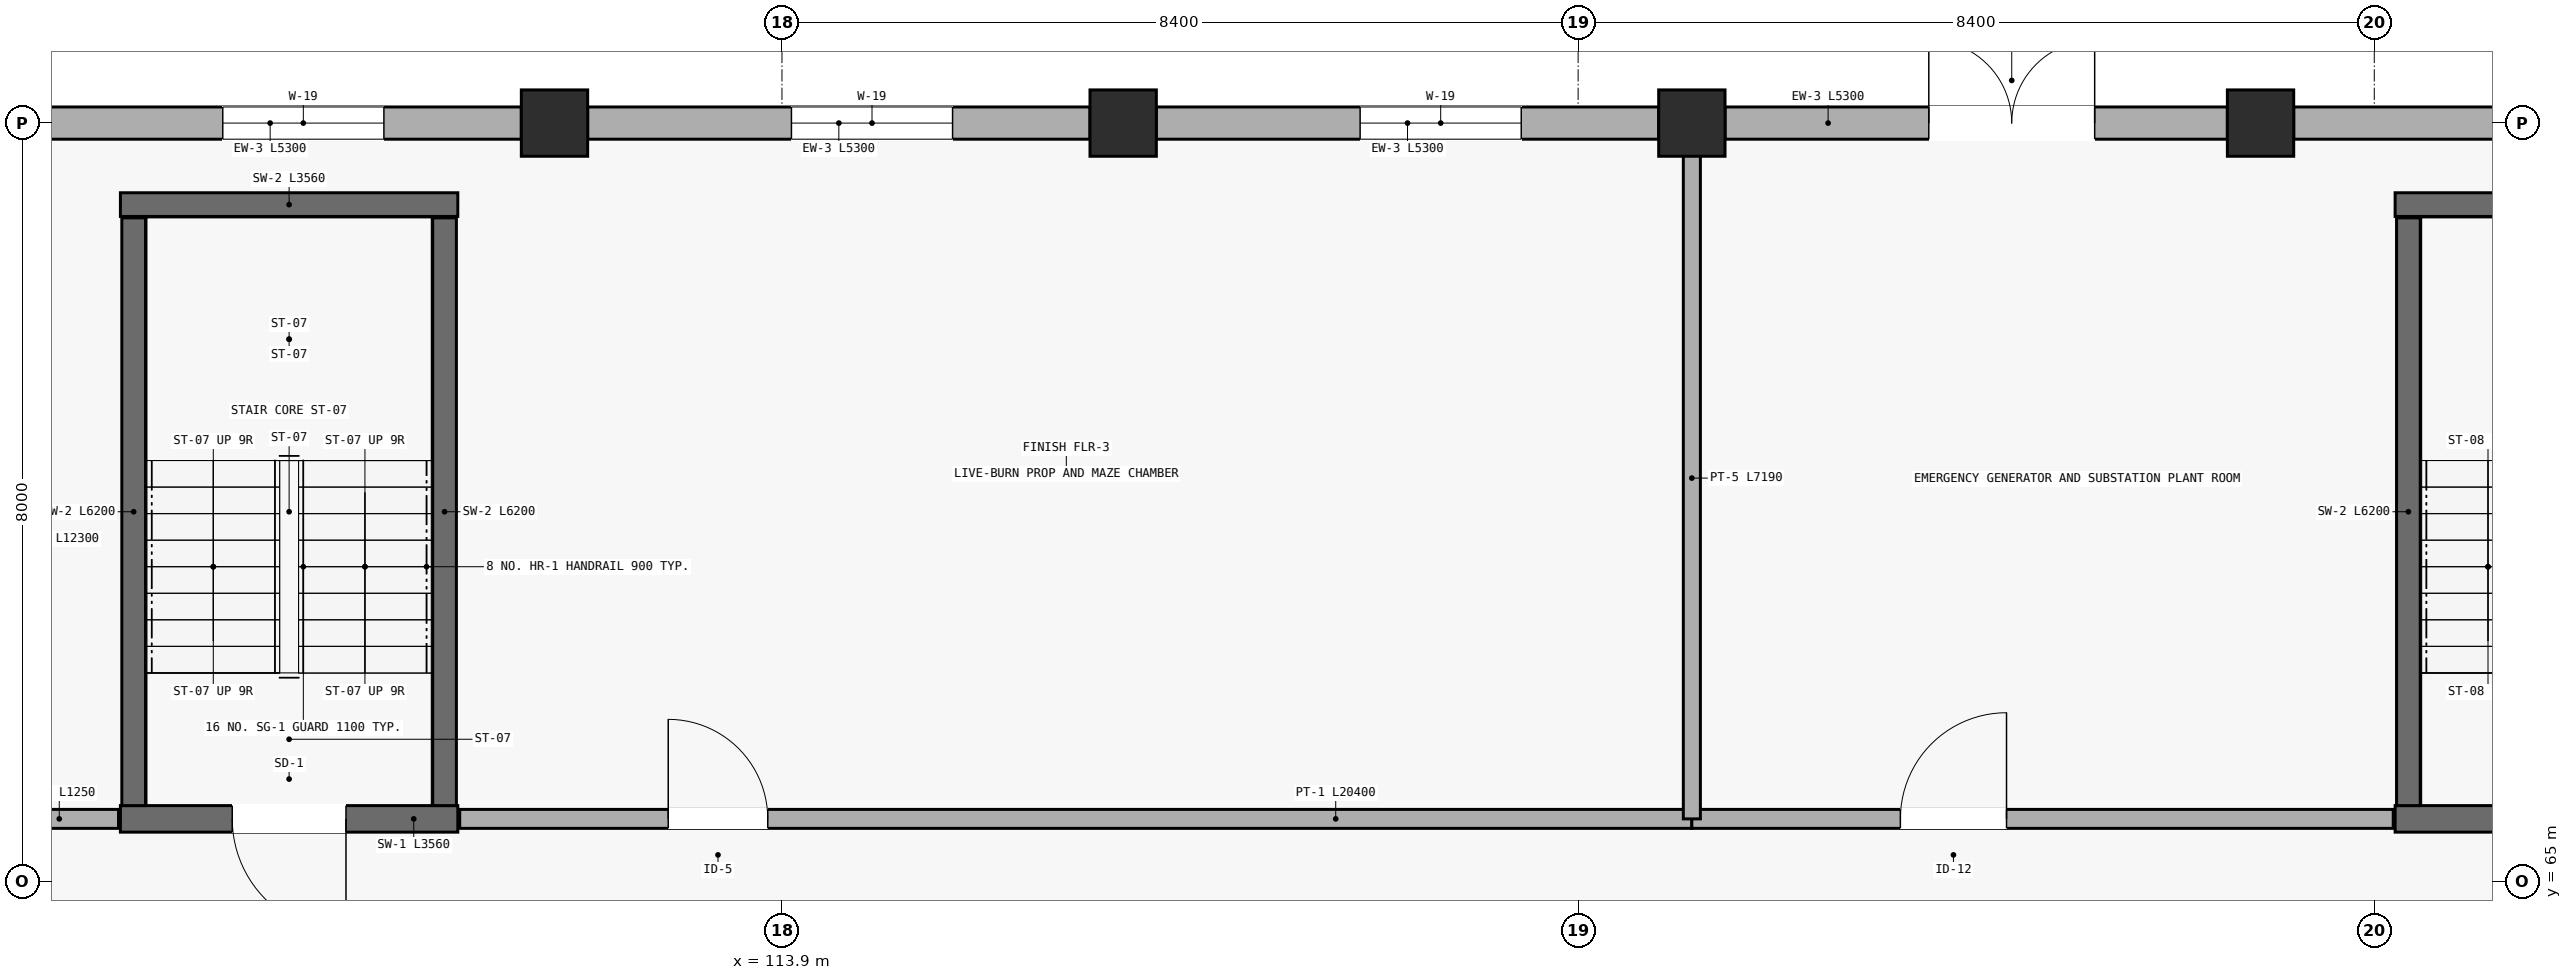
"""IFC4 building model, lengths in metres.
Left out: names, types, materials, properties, quantities, classifications, styles, units other than length and angle.
Written with IfcOpenShell. Run it as: python <this file> out.ifc"""

import sys

from ifc_helpers import new_model, si_unit, direction, frame, frame_2d, origin, origin_2d, place, context, subcontext, project, spatial, rectangle, extrude, element, fill, save


model = new_model("IFC4")
c1 = context("Model", 3, precision=1e-05, world=origin(), true_north=direction((0.0, 1.0)))
c2 = subcontext(c1, "Body", "Model", "MODEL_VIEW")
j1 = project(units=[si_unit("LENGTHUNIT", "METRE"), si_unit("PLANEANGLEUNIT", "RADIAN")], contexts=[c1])
p1 = place(None, origin())
s1 = spatial("IfcSite", under=j1, at=p1, CompositionType="ELEMENT")
p2 = place(p1, origin())
s2 = spatial("IfcBuilding", under=s1, at=p2, CompositionType="ELEMENT")
p3 = place(p2, origin())
s3 = spatial("IfcBuildingStorey", under=s2, at=p3, CompositionType="ELEMENT", Elevation=0.0)
for number, where, z_axis, x_axis in (
    (1, (111.5, 73.0, 0.0), (0.0, 0.0, 1.0), (1.0, 0.0, 0.0)),
    (2, (117.5, 73.0, 0.0), (0.0, 0.0, 1.0), (1.0, 0.0, 0.0)),
    (3, (123.5, 73.0, 0.0), (0.0, 0.0, 1.0), (1.0, 0.0, 0.0)),
    (4, (129.5, 73.0, 0.0), (0.0, 0.0, 1.0), (1.0, 0.0, 0.0)),
):
    element("IfcColumn", number, at=place(p3, frame(where, z_axis=z_axis, x_axis=x_axis)), inside=s3, PredefinedType="COLUMN", context=c2, shape_type="SweptSolid", body=[
        extrude(rectangle(XDim=0.7, YDim=0.7, at=origin_2d()), origin(), (0.0, 0.0, 1.0), 5.85),
    ])
p4 = place(p3, frame((111.15, 73.0, 0.0), z_axis=(0.0, 0.0, 1.0), x_axis=(-1.0, 0.0, 0.0)))
e5 = element("IfcWall", 5, at=p4, inside=s3, PredefinedType="STANDARD", context=c2, shape_type="SweptSolid", body=[
    extrude(rectangle(XDim=5.3, YDim=0.34, at=frame_2d((2.65, 0.0))), origin(), (0.0, 0.0, 1.0), 4.678),
])
p5 = place(p4, frame((1.45, 0.0, 0.85)))
e6 = element("IfcOpeningElement", 6, at=p5, cuts=e5, PredefinedType="OPENING", context=c2, shape_type="SweptSolid", body=[
    extrude(rectangle(XDim=1.7, YDim=1.35, at=frame_2d((0.85, 0.675))), frame((0.0, 0.18, 0.0), z_axis=(0.0, -1.0, 0.0), x_axis=(1.0, 0.0, 0.0)), (0.0, 0.0, 1.0), 0.36),
])
p6 = place(p3, frame((117.15, 73.0, 0.0), z_axis=(0.0, 0.0, 1.0), x_axis=(-1.0, 0.0, 0.0)))
e7 = element("IfcWall", 7, at=p6, inside=s3, PredefinedType="STANDARD", context=c2, shape_type="SweptSolid", body=[
    extrude(rectangle(XDim=5.3, YDim=0.34, at=frame_2d((2.65, 0.0))), origin(), (0.0, 0.0, 1.0), 4.678),
])
p7 = place(p6, frame((1.45, 0.0, 0.85)))
e8 = element("IfcOpeningElement", 8, at=p7, cuts=e7, PredefinedType="OPENING", context=c2, shape_type="SweptSolid", body=[
    extrude(rectangle(XDim=1.7, YDim=1.35, at=frame_2d((0.85, 0.675))), frame((0.0, 0.18, 0.0), z_axis=(0.0, -1.0, 0.0), x_axis=(1.0, 0.0, 0.0)), (0.0, 0.0, 1.0), 0.36),
])
p8 = place(p3, frame((123.15, 73.0, 0.0), z_axis=(0.0, 0.0, 1.0), x_axis=(-1.0, 0.0, 0.0)))
e9 = element("IfcWall", 9, at=p8, inside=s3, PredefinedType="STANDARD", context=c2, shape_type="SweptSolid", body=[
    extrude(rectangle(XDim=5.3, YDim=0.34, at=frame_2d((2.65, 0.0))), origin(), (0.0, 0.0, 1.0), 4.678),
])
p9 = place(p8, frame((1.45, 0.0, 0.85)))
e10 = element("IfcOpeningElement", 10, at=p9, cuts=e9, PredefinedType="OPENING", context=c2, shape_type="SweptSolid", body=[
    extrude(rectangle(XDim=1.7, YDim=1.35, at=frame_2d((0.85, 0.675))), frame((0.0, 0.18, 0.0), z_axis=(0.0, -1.0, 0.0), x_axis=(1.0, 0.0, 0.0)), (0.0, 0.0, 1.0), 0.36),
])
p10 = place(p3, frame((129.15, 73.0, 0.0), z_axis=(0.0, 0.0, 1.0), x_axis=(-1.0, 0.0, 0.0)))
e11 = element("IfcWall", 11, at=p10, inside=s3, PredefinedType="STANDARD", context=c2, shape_type="SweptSolid", body=[
    extrude(rectangle(XDim=5.3, YDim=0.34, at=frame_2d((2.65, 0.0))), origin(), (0.0, 0.0, 1.0), 4.678),
])
p11 = place(p10, frame((1.4, 0.0, 0.0)))
e12 = element("IfcOpeningElement", 12, at=p11, cuts=e11, PredefinedType="OPENING", context=c2, shape_type="SweptSolid", body=[
    extrude(rectangle(XDim=1.75, YDim=2.2, at=frame_2d((0.875, 1.1))), frame((0.0, 0.18, 0.0), z_axis=(0.0, -1.0, 0.0), x_axis=(1.0, 0.0, 0.0)), (0.0, 0.0, 1.0), 0.36),
])
p12 = place(p3, frame((135.15, 73.0, 0.0), z_axis=(0.0, 0.0, 1.0), x_axis=(-1.0, 0.0, 0.0)))
e13 = element("IfcWall", 13, at=p12, inside=s3, PredefinedType="STANDARD", context=c2, shape_type="SweptSolid", body=[
    extrude(rectangle(XDim=5.3, YDim=0.34, at=frame_2d((2.65, 0.0))), origin(), (0.0, 0.0, 1.0), 4.678),
])
p13 = place(p12, frame((1.45, 0.0, 0.85)))
e14 = element("IfcOpeningElement", 14, at=p13, cuts=e13, PredefinedType="OPENING", context=c2, shape_type="SweptSolid", body=[
    extrude(rectangle(XDim=1.7, YDim=1.35, at=frame_2d((0.85, 0.675))), frame((0.0, 0.18, 0.0), z_axis=(0.0, -1.0, 0.0), x_axis=(1.0, 0.0, 0.0)), (0.0, 0.0, 1.0), 0.36),
])
p14 = place(p3, frame((110.48, 65.66, 0.0), z_axis=(0.0, 0.0, 1.0), x_axis=(-1.0, 0.0, 0.0)))
e15 = element("IfcWall", 15, at=p14, inside=s3, PredefinedType="SHEAR", context=c2, shape_type="SweptSolid", body=[
    extrude(rectangle(XDim=3.56, YDim=0.28, at=frame_2d((1.78, 0.0))), origin(), (0.0, 0.0, 1.0), 5.6),
])
p15 = place(p14, frame((1.18, 0.0, 0.0)))
e16 = element("IfcOpeningElement", 16, at=p15, cuts=e15, PredefinedType="OPENING", context=c2, shape_type="SweptSolid", body=[
    extrude(rectangle(XDim=1.2, YDim=2.15, at=frame_2d((0.6, 1.075))), frame((0.0, 0.15, 0.0), z_axis=(0.0, -1.0, 0.0), x_axis=(1.0, 0.0, 0.0)), (0.0, 0.0, 1.0), 0.3),
])
p16 = place(p3, frame((106.92, 72.14, 0.0), z_axis=(0.0, 0.0, 1.0), x_axis=(1.0, 0.0, 0.0)))
e17 = element("IfcWall", 17, at=p16, inside=s3, PredefinedType="SHEAR", context=c2, shape_type="SweptSolid", body=[
    extrude(rectangle(XDim=3.56, YDim=0.25, at=frame_2d((1.78, 0.0))), origin(), (0.0, 0.0, 1.0), 5.6),
])
for number, where, z_axis, x_axis in (
    (18, (110.34, 65.8, 0.0), (0.0, 0.0, 1.0), (0.0, 1.0, 0.0)),
    (19, (107.06, 72.0, 0.0), (0.0, 0.0, 1.0), (0.0, -1.0, 0.0)),
):
    element("IfcWall", number, at=place(p3, frame(where, z_axis=z_axis, x_axis=x_axis)), inside=s3, PredefinedType="SHEAR", context=c2, shape_type="SweptSolid", body=[
        extrude(rectangle(XDim=6.2, YDim=0.25, at=frame_2d((3.1, 0.0))), origin(), (0.0, 0.0, 1.0), 5.6),
    ])
p17 = place(p3, frame((134.48, 65.66, 0.0), z_axis=(0.0, 0.0, 1.0), x_axis=(-1.0, 0.0, 0.0)))
e20 = element("IfcWall", 20, at=p17, inside=s3, PredefinedType="SHEAR", context=c2, shape_type="SweptSolid", body=[
    extrude(rectangle(XDim=3.56, YDim=0.28, at=frame_2d((1.78, 0.0))), origin(), (0.0, 0.0, 1.0), 5.6),
])
p18 = place(p17, frame((1.18, 0.0, 0.0)))
e21 = element("IfcOpeningElement", 21, at=p18, cuts=e20, PredefinedType="OPENING", context=c2, shape_type="SweptSolid", body=[
    extrude(rectangle(XDim=1.2, YDim=2.15, at=frame_2d((0.6, 1.075))), frame((0.0, 0.15, 0.0), z_axis=(0.0, -1.0, 0.0), x_axis=(1.0, 0.0, 0.0)), (0.0, 0.0, 1.0), 0.3),
])
p19 = place(p3, frame((130.92, 72.14, 0.0), z_axis=(0.0, 0.0, 1.0), x_axis=(1.0, 0.0, 0.0)))
e22 = element("IfcWall", 22, at=p19, inside=s3, PredefinedType="SHEAR", context=c2, shape_type="SweptSolid", body=[
    extrude(rectangle(XDim=3.56, YDim=0.25, at=frame_2d((1.78, 0.0))), origin(), (0.0, 0.0, 1.0), 5.6),
])
p20 = place(p3, frame((131.06, 72.0, 0.0), z_axis=(0.0, 0.0, 1.0), x_axis=(0.0, -1.0, 0.0)))
e23 = element("IfcWall", 23, at=p20, inside=s3, PredefinedType="SHEAR", context=c2, shape_type="SweptSolid", body=[
    extrude(rectangle(XDim=6.2, YDim=0.25, at=frame_2d((3.1, 0.0))), origin(), (0.0, 0.0, 1.0), 5.6),
])
p21 = place(p3, frame((105.65, 65.66, 0.0), z_axis=(0.0, 0.0, 1.0), x_axis=(1.0, 0.0, 0.0)))
e24 = element("IfcWall", 24, at=p21, inside=s3, PredefinedType="PARTITIONING", context=c2, shape_type="SweptSolid", body=[
    extrude(rectangle(XDim=1.25, YDim=0.2, at=frame_2d((0.625, 0.0))), origin(), (0.0, 0.0, 1.0), 5.0),
])
p22 = place(p3, frame((110.5, 65.66, 0.0), z_axis=(0.0, 0.0, 1.0), x_axis=(1.0, 0.0, 0.0)))
e25 = element("IfcWall", 25, at=p22, inside=s3, PredefinedType="PARTITIONING", context=c2, shape_type="SweptSolid", body=[
    extrude(rectangle(XDim=13.0, YDim=0.2, at=frame_2d((6.5, 0.0))), origin(), (0.0, 0.0, 1.0), 5.0),
])
p23 = place(p22, frame((2.2, 0.0, 0.0)))
e26 = element("IfcOpeningElement", 26, at=p23, cuts=e25, PredefinedType="OPENING", context=c2, shape_type="SweptSolid", body=[
    extrude(rectangle(XDim=1.05, YDim=2.14, at=frame_2d((0.525, 1.07))), frame((0.0, 0.11, 0.0), z_axis=(0.0, -1.0, 0.0), x_axis=(1.0, 0.0, 0.0)), (0.0, 0.0, 1.0), 0.22),
])
p24 = place(p3, frame((123.5, 65.66, 0.0), z_axis=(0.0, 0.0, 1.0), x_axis=(1.0, 0.0, 0.0)))
e27 = element("IfcWall", 27, at=p24, inside=s3, PredefinedType="PARTITIONING", context=c2, shape_type="SweptSolid", body=[
    extrude(rectangle(XDim=7.4, YDim=0.2, at=frame_2d((3.7, 0.0))), origin(), (0.0, 0.0, 1.0), 5.0),
])
p25 = place(p24, frame((2.2, 0.0, 0.0)))
e28 = element("IfcOpeningElement", 28, at=p25, cuts=e27, PredefinedType="OPENING", context=c2, shape_type="SweptSolid", body=[
    extrude(rectangle(XDim=1.12, YDim=2.15, at=frame_2d((0.56, 1.075))), frame((0.0, 0.11, 0.0), z_axis=(0.0, -1.0, 0.0), x_axis=(1.0, 0.0, 0.0)), (0.0, 0.0, 1.0), 0.22),
])
p26 = place(p3, frame((123.5, 65.66, 0.0), z_axis=(0.0, 0.0, 1.0), x_axis=(0.0, 1.0, 0.0)))
e29 = element("IfcWall", 29, at=p26, inside=s3, PredefinedType="PARTITIONING", context=c2, shape_type="SweptSolid", body=[
    extrude(rectangle(XDim=7.19, YDim=0.18, at=frame_2d((3.595, 0.0))), origin(), (0.0, 0.0, 1.0), 4.749),
])
p27 = place(p5, origin())
e30 = element("IfcWindow", 30, at=p27, inside=s3, PartitioningType="DOUBLE_PANEL_HORIZONTAL", PredefinedType="WINDOW", context=c2, shape_type="SweptSolid", body=[
    extrude(rectangle(XDim=1.7, YDim=1.35, at=frame_2d((0.85, 0.675))), frame((0.0, 0.03, 0.0), z_axis=(0.0, -1.0, 0.0), x_axis=(1.0, 0.0, 0.0)), (0.0, 0.0, 1.0), 0.06),
])
fill(e6, e30)
p28 = place(p7, origin())
e31 = element("IfcWindow", 31, at=p28, inside=s3, PartitioningType="DOUBLE_PANEL_HORIZONTAL", PredefinedType="WINDOW", context=c2, shape_type="SweptSolid", body=[
    extrude(rectangle(XDim=1.7, YDim=1.35, at=frame_2d((0.85, 0.675))), frame((0.0, 0.03, 0.0), z_axis=(0.0, -1.0, 0.0), x_axis=(1.0, 0.0, 0.0)), (0.0, 0.0, 1.0), 0.06),
])
fill(e8, e31)
p29 = place(p9, origin())
e32 = element("IfcWindow", 32, at=p29, inside=s3, PartitioningType="DOUBLE_PANEL_HORIZONTAL", PredefinedType="WINDOW", context=c2, shape_type="SweptSolid", body=[
    extrude(rectangle(XDim=1.7, YDim=1.35, at=frame_2d((0.85, 0.675))), frame((0.0, 0.03, 0.0), z_axis=(0.0, -1.0, 0.0), x_axis=(1.0, 0.0, 0.0)), (0.0, 0.0, 1.0), 0.06),
])
fill(e10, e32)
p30 = place(p11, frame((1.75, 0.0, 0.0), z_axis=(0.0, 0.0, 1.0), x_axis=(-1.0, 0.0, 0.0)))
e33 = element("IfcDoor", 33, at=p30, inside=s3, OperationType="DOUBLE_DOOR_SINGLE_SWING", PredefinedType="DOOR", context=c2, shape_type="SweptSolid", body=[
    extrude(rectangle(XDim=1.75, YDim=2.2, at=frame_2d((0.875, 1.1))), frame((0.0, 0.025, 0.0), z_axis=(0.0, -1.0, 0.0), x_axis=(1.0, 0.0, 0.0)), (0.0, 0.0, 1.0), 0.05),
])
fill(e12, e33)
p31 = place(p15, origin())
e34 = element("IfcDoor", 34, at=p31, inside=s3, OperationType="SINGLE_SWING_LEFT", PredefinedType="DOOR", context=c2, shape_type="SweptSolid", body=[
    extrude(rectangle(XDim=1.2, YDim=2.15, at=frame_2d((0.6, 1.075))), frame((0.0, 0.025, 0.0), z_axis=(0.0, -1.0, 0.0), x_axis=(1.0, 0.0, 0.0)), (0.0, 0.0, 1.0), 0.05),
])
fill(e16, e34)
p32 = place(p23, origin())
e35 = element("IfcDoor", 35, at=p32, inside=s3, OperationType="SINGLE_SWING_LEFT", PredefinedType="DOOR", context=c2, shape_type="SweptSolid", body=[
    extrude(rectangle(XDim=1.05, YDim=2.14, at=frame_2d((0.525, 1.07))), frame((0.0, 0.025, 0.0), z_axis=(0.0, -1.0, 0.0), x_axis=(1.0, 0.0, 0.0)), (0.0, 0.0, 1.0), 0.05),
])
fill(e26, e35)
p33 = place(p25, origin())
e36 = element("IfcDoor", 36, at=p33, inside=s3, OperationType="SINGLE_SWING_RIGHT", PredefinedType="DOOR", context=c2, shape_type="SweptSolid", body=[
    extrude(rectangle(XDim=1.12, YDim=2.15, at=frame_2d((0.56, 1.075))), frame((0.0, 0.025, 0.0), z_axis=(0.0, -1.0, 0.0), x_axis=(1.0, 0.0, 0.0)), (0.0, 0.0, 1.0), 0.05),
])
fill(e28, e36)
save(model, sys.argv[1])
